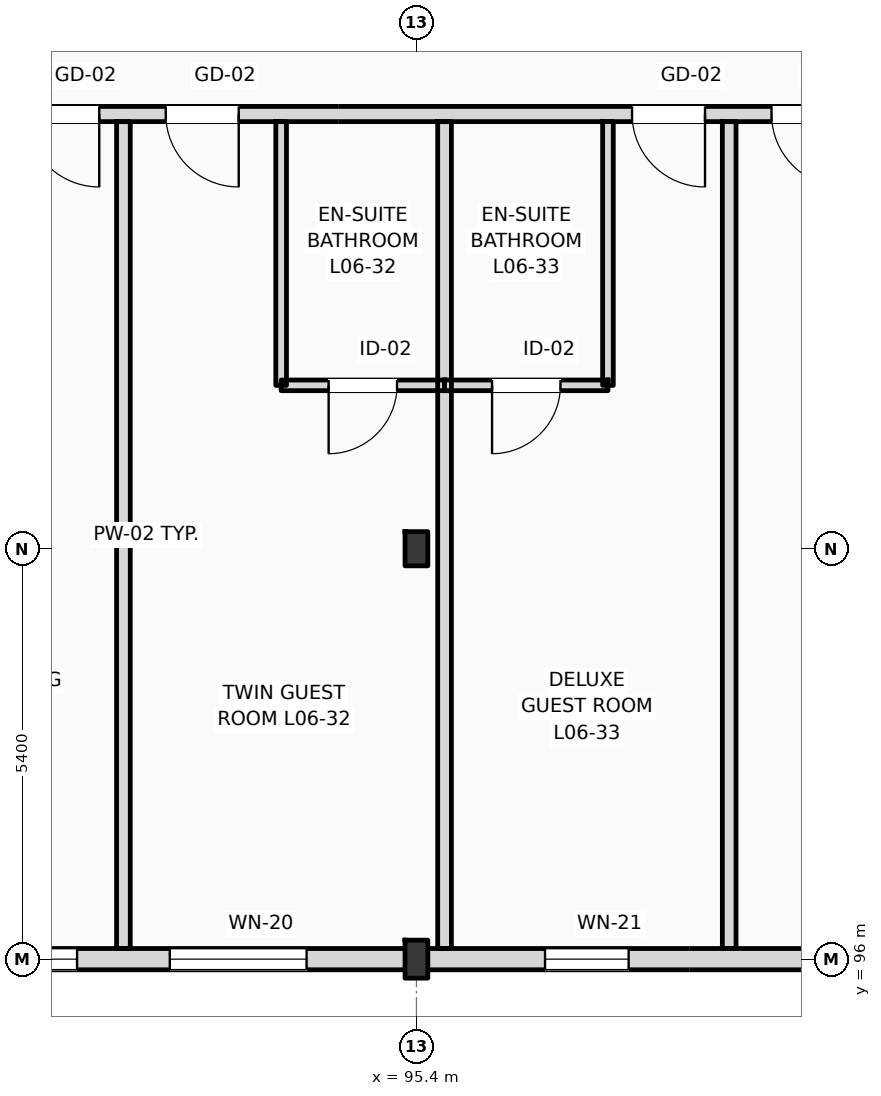
"""IFC4 building model, lengths in metres.
Left out: names, types, materials, properties, quantities, classifications, styles, units other than length and angle.
Written with IfcOpenShell. Run it as: python <this file> out.ifc"""

import sys

from ifc_helpers import new_model, si_unit, direction, frame, frame_2d, origin, origin_2d, place, context, subcontext, project, spatial, rectangle, i_section, extrude, element, fill, save


model = new_model("IFC4")
c1 = context("Model", 3, precision=1e-05, world=origin(), true_north=direction((0.0, 1.0)))
c2 = subcontext(c1, "Body", "Model", "MODEL_VIEW")
j1 = project(units=[si_unit("LENGTHUNIT", "METRE"), si_unit("PLANEANGLEUNIT", "RADIAN")], contexts=[c1])
p1 = place(None, origin())
s1 = spatial("IfcSite", under=j1, at=p1, CompositionType="ELEMENT")
p2 = place(p1, origin())
s2 = spatial("IfcBuilding", under=s1, at=p2, CompositionType="ELEMENT")
p3 = place(p2, frame((0.0, 0.0, 28.2)))
s3 = spatial("IfcBuildingStorey", under=s2, at=p3, CompositionType="ELEMENT", Elevation=28.2)
p4 = place(p3, frame((95.4, 96.0, 0.0), z_axis=(0.0, 0.0, 1.0), x_axis=(1.0, 0.0, 0.0)))
e1 = element("IfcColumn", 1, at=p4, inside=s3, PredefinedType="COLUMN", context=c2, shape_type="SweptSolid", body=[
    extrude(i_section(OverallWidth=0.3, OverallDepth=0.5, WebThickness=0.014, FlangeThickness=0.028, FilletRadius=0.027, at=origin_2d()), origin(), (0.0, 0.0, 1.0), 3.6),
])
p5 = place(p3, frame((95.4, 101.4, 0.0), z_axis=(0.0, 0.0, 1.0), x_axis=(1.0, 0.0, 0.0)))
e2 = element("IfcColumn", 2, at=p5, inside=s3, PredefinedType="COLUMN", context=c2, shape_type="SweptSolid", body=[
    extrude(i_section(OverallWidth=0.3, OverallDepth=0.45, WebThickness=0.014, FlangeThickness=0.026, FilletRadius=0.027, at=origin_2d()), origin(), (0.0, 0.0, 1.0), 3.6),
])
p6 = place(p3, frame((25.2, 96.0, 0.0), z_axis=(0.0, 0.0, 1.0), x_axis=(1.0, 0.0, 0.0)))
e3 = element("IfcWall", 3, at=p6, inside=s3, PredefinedType="STANDARD", context=c2, shape_type="SweptSolid", body=[
    extrude(rectangle(XDim=94.8, YDim=0.28, at=frame_2d((47.4, 0.0))), origin(), (0.0, 0.0, 1.0), 2.8),
])
p7 = place(p6, frame((16.454, 0.0, 0.9)))
e4 = element("IfcOpeningElement", 4, at=p7, cuts=e3, PredefinedType="OPENING", context=c2, shape_type="SweptSolid", body=[
    extrude(rectangle(XDim=2.7, YDim=1.72, at=frame_2d((1.35, 0.86))), frame((0.0, 0.15, 0.0), z_axis=(0.0, -1.0, 0.0), x_axis=(1.0, 0.0, 0.0)), (0.0, 0.0, 1.0), 0.3),
])
p8 = place(p6, frame((20.068, 0.0, 0.9)))
e5 = element("IfcOpeningElement", 5, at=p8, cuts=e3, PredefinedType="OPENING", context=c2, shape_type="SweptSolid", body=[
    extrude(rectangle(XDim=2.389, YDim=1.72, at=frame_2d((1.194, 0.86))), frame((0.0, 0.15, 0.0), z_axis=(0.0, -1.0, 0.0), x_axis=(1.0, 0.0, 0.0)), (0.0, 0.0, 1.0), 0.3),
])
p9 = place(p6, frame((24.277, 0.0, 0.9)))
e6 = element("IfcOpeningElement", 6, at=p9, cuts=e3, PredefinedType="OPENING", context=c2, shape_type="SweptSolid", body=[
    extrude(rectangle(XDim=1.8, YDim=1.72, at=frame_2d((0.9, 0.86))), frame((0.0, 0.15, 0.0), z_axis=(0.0, -1.0, 0.0), x_axis=(1.0, 0.0, 0.0)), (0.0, 0.0, 1.0), 0.3),
])
p10 = place(p6, frame((27.885, 0.0, 0.9)))
e7 = element("IfcOpeningElement", 7, at=p10, cuts=e3, PredefinedType="OPENING", context=c2, shape_type="SweptSolid", body=[
    extrude(rectangle(XDim=2.388, YDim=1.72, at=frame_2d((1.194, 0.86))), frame((0.0, 0.15, 0.0), z_axis=(0.0, -1.0, 0.0), x_axis=(1.0, 0.0, 0.0)), (0.0, 0.0, 1.0), 0.3),
])
p11 = place(p6, frame((32.093, 0.0, 0.9)))
e8 = element("IfcOpeningElement", 8, at=p11, cuts=e3, PredefinedType="OPENING", context=c2, shape_type="SweptSolid", body=[
    extrude(rectangle(XDim=1.8, YDim=1.72, at=frame_2d((0.9, 0.86))), frame((0.0, 0.15, 0.0), z_axis=(0.0, -1.0, 0.0), x_axis=(1.0, 0.0, 0.0)), (0.0, 0.0, 1.0), 0.3),
])
p12 = place(p6, frame((35.702, 0.0, 0.9)))
e9 = element("IfcOpeningElement", 9, at=p12, cuts=e3, PredefinedType="OPENING", context=c2, shape_type="SweptSolid", body=[
    extrude(rectangle(XDim=2.488, YDim=1.72, at=frame_2d((1.244, 0.86))), frame((0.0, 0.15, 0.0), z_axis=(0.0, -1.0, 0.0), x_axis=(1.0, 0.0, 0.0)), (0.0, 0.0, 1.0), 0.3),
])
p13 = place(p6, frame((55.56, 0.0, 0.9)))
e10 = element("IfcOpeningElement", 10, at=p13, cuts=e3, PredefinedType="OPENING", context=c2, shape_type="SweptSolid", body=[
    extrude(rectangle(XDim=1.8, YDim=1.72, at=frame_2d((0.9, 0.86))), frame((0.0, 0.15, 0.0), z_axis=(0.0, -1.0, 0.0), x_axis=(1.0, 0.0, 0.0)), (0.0, 0.0, 1.0), 0.3),
])
p14 = place(p6, frame((58.985, 0.0, 0.9)))
e11 = element("IfcOpeningElement", 11, at=p14, cuts=e3, PredefinedType="OPENING", context=c2, shape_type="SweptSolid", body=[
    extrude(rectangle(XDim=1.8, YDim=1.72, at=frame_2d((0.9, 0.86))), frame((0.0, 0.15, 0.0), z_axis=(0.0, -1.0, 0.0), x_axis=(1.0, 0.0, 0.0)), (0.0, 0.0, 1.0), 0.3),
])
p15 = place(p6, frame((63.21, 0.0, 0.9)))
e12 = element("IfcOpeningElement", 12, at=p15, cuts=e3, PredefinedType="OPENING", context=c2, shape_type="SweptSolid", body=[
    extrude(rectangle(XDim=2.525, YDim=1.72, at=frame_2d((1.262, 0.86))), frame((0.0, 0.15, 0.0), z_axis=(0.0, -1.0, 0.0), x_axis=(1.0, 0.0, 0.0)), (0.0, 0.0, 1.0), 0.3),
])
p16 = place(p6, frame((66.955, 0.0, 0.9)))
e13 = element("IfcOpeningElement", 13, at=p16, cuts=e3, PredefinedType="OPENING", context=c2, shape_type="SweptSolid", body=[
    extrude(rectangle(XDim=1.8, YDim=1.72, at=frame_2d((0.9, 0.86))), frame((0.0, 0.15, 0.0), z_axis=(0.0, -1.0, 0.0), x_axis=(1.0, 0.0, 0.0)), (0.0, 0.0, 1.0), 0.3),
])
p17 = place(p6, frame((71.892, 0.0, 0.9)))
e14 = element("IfcOpeningElement", 14, at=p17, cuts=e3, PredefinedType="OPENING", context=c2, shape_type="SweptSolid", body=[
    extrude(rectangle(XDim=1.1, YDim=1.5, at=frame_2d((0.55, 0.75))), frame((0.0, 0.15, 0.0), z_axis=(0.0, -1.0, 0.0), x_axis=(1.0, 0.0, 0.0)), (0.0, 0.0, 1.0), 0.3),
])
p18 = place(p6, frame((75.802, 0.0, 0.9)))
e15 = element("IfcOpeningElement", 15, at=p18, cuts=e3, PredefinedType="OPENING", context=c2, shape_type="SweptSolid", body=[
    extrude(rectangle(XDim=1.25, YDim=1.6, at=frame_2d((0.625, 0.8))), frame((0.0, 0.15, 0.0), z_axis=(0.0, -1.0, 0.0), x_axis=(1.0, 0.0, 0.0)), (0.0, 0.0, 1.0), 0.3),
])
p19 = place(p6, frame((79.712, 0.0, 0.9)))
e16 = element("IfcOpeningElement", 16, at=p19, cuts=e3, PredefinedType="OPENING", context=c2, shape_type="SweptSolid", body=[
    extrude(rectangle(XDim=1.4, YDim=1.7, at=frame_2d((0.7, 0.85))), frame((0.0, 0.15, 0.0), z_axis=(0.0, -1.0, 0.0), x_axis=(1.0, 0.0, 0.0)), (0.0, 0.0, 1.0), 0.3),
])
p20 = place(p6, frame((83.597, 0.0, 0.9)))
e17 = element("IfcOpeningElement", 17, at=p20, cuts=e3, PredefinedType="OPENING", context=c2, shape_type="SweptSolid", body=[
    extrude(rectangle(XDim=1.6, YDim=1.72, at=frame_2d((0.8, 0.86))), frame((0.0, 0.15, 0.0), z_axis=(0.0, -1.0, 0.0), x_axis=(1.0, 0.0, 0.0)), (0.0, 0.0, 1.0), 0.3),
])
p21 = place(p6, frame((87.507, 0.0, 0.9)))
e18 = element("IfcOpeningElement", 18, at=p21, cuts=e3, PredefinedType="OPENING", context=c2, shape_type="SweptSolid", body=[
    extrude(rectangle(XDim=1.75, YDim=1.72, at=frame_2d((0.875, 0.86))), frame((0.0, 0.15, 0.0), z_axis=(0.0, -1.0, 0.0), x_axis=(1.0, 0.0, 0.0)), (0.0, 0.0, 1.0), 0.3),
])
p22 = place(p6, frame((91.328, 0.0, 0.9)))
e19 = element("IfcOpeningElement", 19, at=p22, cuts=e3, PredefinedType="OPENING", context=c2, shape_type="SweptSolid", body=[
    extrude(rectangle(XDim=2.0, YDim=1.72, at=frame_2d((1.0, 0.86))), frame((0.0, 0.15, 0.0), z_axis=(0.0, -1.0, 0.0), x_axis=(1.0, 0.0, 0.0)), (0.0, 0.0, 1.0), 0.3),
])
p23 = place(p3, frame((79.76, 107.12, 0.0), z_axis=(0.0, 0.0, 1.0), x_axis=(1.0, 0.0, 0.0)))
e20 = element("IfcWall", 20, at=p23, inside=s3, PredefinedType="PARTITIONING", context=c2, shape_type="SweptSolid", body=[
    extrude(rectangle(XDim=40.1, YDim=0.2, at=frame_2d((20.05, 0.0))), origin(), (0.0, 0.0, 1.0), 3.36),
])
p24 = place(p23, frame((2.497, 0.0, 0.0)))
e21 = element("IfcOpeningElement", 21, at=p24, cuts=e20, PredefinedType="OPENING", context=c2, shape_type="SweptSolid", body=[
    extrude(rectangle(XDim=0.96, YDim=2.2, at=frame_2d((0.48, 1.1))), frame((0.0, 0.11, 0.0), z_axis=(0.0, -1.0, 0.0), x_axis=(1.0, 0.0, 0.0)), (0.0, 0.0, 1.0), 0.22),
])
p25 = place(p23, frame((4.372, 0.0, 0.0)))
e22 = element("IfcOpeningElement", 22, at=p25, cuts=e20, PredefinedType="OPENING", context=c2, shape_type="SweptSolid", body=[
    extrude(rectangle(XDim=0.96, YDim=2.2, at=frame_2d((0.48, 1.1))), frame((0.0, 0.11, 0.0), z_axis=(0.0, -1.0, 0.0), x_axis=(1.0, 0.0, 0.0)), (0.0, 0.0, 1.0), 0.22),
])
p26 = place(p23, frame((10.507, 0.0, 0.0)))
e23 = element("IfcOpeningElement", 23, at=p26, cuts=e20, PredefinedType="OPENING", context=c2, shape_type="SweptSolid", body=[
    extrude(rectangle(XDim=0.96, YDim=2.2, at=frame_2d((0.48, 1.1))), frame((0.0, 0.11, 0.0), z_axis=(0.0, -1.0, 0.0), x_axis=(1.0, 0.0, 0.0)), (0.0, 0.0, 1.0), 0.22),
])
p27 = place(p23, frame((12.342, 0.0, 0.0)))
e24 = element("IfcOpeningElement", 24, at=p27, cuts=e20, PredefinedType="OPENING", context=c2, shape_type="SweptSolid", body=[
    extrude(rectangle(XDim=0.96, YDim=2.2, at=frame_2d((0.48, 1.1))), frame((0.0, 0.11, 0.0), z_axis=(0.0, -1.0, 0.0), x_axis=(1.0, 0.0, 0.0)), (0.0, 0.0, 1.0), 0.22),
])
p28 = place(p23, frame((18.477, 0.0, 0.0)))
e25 = element("IfcOpeningElement", 25, at=p28, cuts=e20, PredefinedType="OPENING", context=c2, shape_type="SweptSolid", body=[
    extrude(rectangle(XDim=0.96, YDim=2.2, at=frame_2d((0.48, 1.1))), frame((0.0, 0.11, 0.0), z_axis=(0.0, -1.0, 0.0), x_axis=(1.0, 0.0, 0.0)), (0.0, 0.0, 1.0), 0.22),
])
p29 = place(p23, frame((20.312, 0.0, 0.0)))
e26 = element("IfcOpeningElement", 26, at=p29, cuts=e20, PredefinedType="OPENING", context=c2, shape_type="SweptSolid", body=[
    extrude(rectangle(XDim=0.96, YDim=2.2, at=frame_2d((0.48, 1.1))), frame((0.0, 0.11, 0.0), z_axis=(0.0, -1.0, 0.0), x_axis=(1.0, 0.0, 0.0)), (0.0, 0.0, 1.0), 0.22),
])
p30 = place(p23, frame((26.447, 0.0, 0.0)))
e27 = element("IfcOpeningElement", 27, at=p30, cuts=e20, PredefinedType="OPENING", context=c2, shape_type="SweptSolid", body=[
    extrude(rectangle(XDim=0.96, YDim=2.2, at=frame_2d((0.48, 1.1))), frame((0.0, 0.11, 0.0), z_axis=(0.0, -1.0, 0.0), x_axis=(1.0, 0.0, 0.0)), (0.0, 0.0, 1.0), 0.22),
])
p31 = place(p23, frame((28.282, 0.0, 0.0)))
e28 = element("IfcOpeningElement", 28, at=p31, cuts=e20, PredefinedType="OPENING", context=c2, shape_type="SweptSolid", body=[
    extrude(rectangle(XDim=0.96, YDim=2.2, at=frame_2d((0.48, 1.1))), frame((0.0, 0.11, 0.0), z_axis=(0.0, -1.0, 0.0), x_axis=(1.0, 0.0, 0.0)), (0.0, 0.0, 1.0), 0.22),
])
p32 = place(p23, frame((34.417, 0.0, 0.0)))
e29 = element("IfcOpeningElement", 29, at=p32, cuts=e20, PredefinedType="OPENING", context=c2, shape_type="SweptSolid", body=[
    extrude(rectangle(XDim=0.96, YDim=2.2, at=frame_2d((0.48, 1.1))), frame((0.0, 0.11, 0.0), z_axis=(0.0, -1.0, 0.0), x_axis=(1.0, 0.0, 0.0)), (0.0, 0.0, 1.0), 0.22),
])
p33 = place(p23, frame((36.212, 0.0, 0.0)))
e30 = element("IfcOpeningElement", 30, at=p33, cuts=e20, PredefinedType="OPENING", context=c2, shape_type="SweptSolid", body=[
    extrude(rectangle(XDim=0.96, YDim=2.2, at=frame_2d((0.48, 1.1))), frame((0.0, 0.11, 0.0), z_axis=(0.0, -1.0, 0.0), x_axis=(1.0, 0.0, 0.0)), (0.0, 0.0, 1.0), 0.22),
])
for number, where, z_axis, x_axis in (
    (31, (91.545, 96.14, 0.0), (0.0, 0.0, 1.0), (0.0, 1.0, 0.0)),
    (32, (95.77, 96.14, 0.0), (0.0, 0.0, 1.0), (0.0, 1.0, 0.0)),
):
    element("IfcWall", number, at=place(p3, frame(where, z_axis=z_axis, x_axis=x_axis)), inside=s3, PredefinedType="PARTITIONING", context=c2, shape_type="SweptSolid", body=[
        extrude(rectangle(XDim=10.88, YDim=0.18, at=frame_2d((5.44, 0.0))), origin(), (0.0, 0.0, 1.0), 3.36),
    ])
p34 = place(p3, frame((93.62, 103.55, 0.0), z_axis=(0.0, 0.0, 1.0), x_axis=(0.0, 1.0, 0.0)))
e33 = element("IfcWall", 33, at=p34, inside=s3, PredefinedType="PARTITIONING", context=c2, shape_type="SweptSolid", body=[
    extrude(rectangle(XDim=3.47, YDim=0.14, at=frame_2d((1.735, 0.0))), origin(), (0.0, 0.0, 1.0), 3.36),
])
p35 = place(p3, frame((93.62, 103.55, 0.0), z_axis=(0.0, 0.0, 1.0), x_axis=(1.0, 0.0, 0.0)))
e34 = element("IfcWall", 34, at=p35, inside=s3, PredefinedType="PARTITIONING", context=c2, shape_type="SweptSolid", body=[
    extrude(rectangle(XDim=2.15, YDim=0.14, at=frame_2d((1.075, 0.0))), origin(), (0.0, 0.0, 1.0), 3.36),
])
p36 = place(p35, frame((0.625, 0.0, 0.0)))
e35 = element("IfcOpeningElement", 35, at=p36, cuts=e34, PredefinedType="OPENING", context=c2, shape_type="SweptSolid", body=[
    extrude(rectangle(XDim=0.9, YDim=2.1, at=frame_2d((0.45, 1.05))), frame((0.0, 0.08, 0.0), z_axis=(0.0, -1.0, 0.0), x_axis=(1.0, 0.0, 0.0)), (0.0, 0.0, 1.0), 0.16),
])
p37 = place(p3, frame((99.515, 96.14, 0.0), z_axis=(0.0, 0.0, 1.0), x_axis=(0.0, 1.0, 0.0)))
e36 = element("IfcWall", 36, at=p37, inside=s3, PredefinedType="PARTITIONING", context=c2, shape_type="SweptSolid", body=[
    extrude(rectangle(XDim=10.88, YDim=0.18, at=frame_2d((5.44, 0.0))), origin(), (0.0, 0.0, 1.0), 3.36),
])
p38 = place(p3, frame((97.92, 103.55, 0.0), z_axis=(0.0, 0.0, 1.0), x_axis=(0.0, 1.0, 0.0)))
e37 = element("IfcWall", 37, at=p38, inside=s3, PredefinedType="PARTITIONING", context=c2, shape_type="SweptSolid", body=[
    extrude(rectangle(XDim=3.47, YDim=0.14, at=frame_2d((1.735, 0.0))), origin(), (0.0, 0.0, 1.0), 3.05),
])
p39 = place(p3, frame((95.77, 103.55, 0.0), z_axis=(0.0, 0.0, 1.0), x_axis=(1.0, 0.0, 0.0)))
e38 = element("IfcWall", 38, at=p39, inside=s3, PredefinedType="PARTITIONING", context=c2, shape_type="SweptSolid", body=[
    extrude(rectangle(XDim=2.15, YDim=0.14, at=frame_2d((1.075, 0.0))), origin(), (0.0, 0.0, 1.0), 3.36),
])
p40 = place(p39, frame((0.625, 0.0, 0.0)))
e39 = element("IfcOpeningElement", 39, at=p40, cuts=e38, PredefinedType="OPENING", context=c2, shape_type="SweptSolid", body=[
    extrude(rectangle(XDim=0.9, YDim=2.1, at=frame_2d((0.45, 1.05))), frame((0.0, 0.08, 0.0), z_axis=(0.0, -1.0, 0.0), x_axis=(1.0, 0.0, 0.0)), (0.0, 0.0, 1.0), 0.16),
])
p41 = place(p15, origin())
e40 = element("IfcWindow", 40, at=p41, inside=s3, PartitioningType="DOUBLE_PANEL_VERTICAL", PredefinedType="WINDOW", context=c2, shape_type="SweptSolid", body=[
    extrude(rectangle(XDim=2.525, YDim=1.72, at=frame_2d((1.262, 0.86))), frame((0.0, 0.03, 0.0), z_axis=(0.0, -1.0, 0.0), x_axis=(1.0, 0.0, 0.0)), (0.0, 0.0, 1.0), 0.06),
])
fill(e12, e40)
p42 = place(p16, origin())
e41 = element("IfcWindow", 41, at=p42, inside=s3, PartitioningType="DOUBLE_PANEL_VERTICAL", PredefinedType="WINDOW", context=c2, shape_type="SweptSolid", body=[
    extrude(rectangle(XDim=1.8, YDim=1.72, at=frame_2d((0.9, 0.86))), frame((0.0, 0.03, 0.0), z_axis=(0.0, -1.0, 0.0), x_axis=(1.0, 0.0, 0.0)), (0.0, 0.0, 1.0), 0.06),
])
fill(e13, e41)
p43 = place(p17, origin())
e42 = element("IfcWindow", 42, at=p43, inside=s3, PartitioningType="DOUBLE_PANEL_VERTICAL", PredefinedType="WINDOW", context=c2, shape_type="SweptSolid", body=[
    extrude(rectangle(XDim=1.1, YDim=1.5, at=frame_2d((0.55, 0.75))), frame((0.0, 0.03, 0.0), z_axis=(0.0, -1.0, 0.0), x_axis=(1.0, 0.0, 0.0)), (0.0, 0.0, 1.0), 0.06),
])
fill(e14, e42)
p44 = place(p26, frame((0.96, 0.0, 0.0), z_axis=(0.0, 0.0, 1.0), x_axis=(-1.0, 0.0, 0.0)))
e43 = element("IfcDoor", 43, at=p44, inside=s3, OperationType="SINGLE_SWING_RIGHT", PredefinedType="DOOR", context=c2, shape_type="SweptSolid", body=[
    extrude(rectangle(XDim=0.96, YDim=2.2, at=frame_2d((0.48, 1.1))), frame((0.0, 0.025, 0.0), z_axis=(0.0, -1.0, 0.0), x_axis=(1.0, 0.0, 0.0)), (0.0, 0.0, 1.0), 0.05),
])
fill(e23, e43)
p45 = place(p27, frame((0.96, 0.0, 0.0), z_axis=(0.0, 0.0, 1.0), x_axis=(-1.0, 0.0, 0.0)))
e44 = element("IfcDoor", 44, at=p45, inside=s3, OperationType="SINGLE_SWING_RIGHT", PredefinedType="DOOR", context=c2, shape_type="SweptSolid", body=[
    extrude(rectangle(XDim=0.96, YDim=2.2, at=frame_2d((0.48, 1.1))), frame((0.0, 0.025, 0.0), z_axis=(0.0, -1.0, 0.0), x_axis=(1.0, 0.0, 0.0)), (0.0, 0.0, 1.0), 0.05),
])
fill(e24, e44)
p46 = place(p36, frame((0.9, 0.0, 0.0), z_axis=(0.0, 0.0, 1.0), x_axis=(-1.0, 0.0, 0.0)))
e45 = element("IfcDoor", 45, at=p46, inside=s3, OperationType="SINGLE_SWING_LEFT", PredefinedType="DOOR", context=c2, shape_type="SweptSolid", body=[
    extrude(rectangle(XDim=0.9, YDim=2.1, at=frame_2d((0.45, 1.05))), frame((0.0, 0.025, 0.0), z_axis=(0.0, -1.0, 0.0), x_axis=(1.0, 0.0, 0.0)), (0.0, 0.0, 1.0), 0.05),
])
fill(e35, e45)
p47 = place(p28, frame((0.96, 0.0, 0.0), z_axis=(0.0, 0.0, 1.0), x_axis=(-1.0, 0.0, 0.0)))
e46 = element("IfcDoor", 46, at=p47, inside=s3, OperationType="SINGLE_SWING_RIGHT", PredefinedType="DOOR", context=c2, shape_type="SweptSolid", body=[
    extrude(rectangle(XDim=0.96, YDim=2.2, at=frame_2d((0.48, 1.1))), frame((0.0, 0.025, 0.0), z_axis=(0.0, -1.0, 0.0), x_axis=(1.0, 0.0, 0.0)), (0.0, 0.0, 1.0), 0.05),
])
fill(e25, e46)
p48 = place(p40, frame((0.9, 0.0, 0.0), z_axis=(0.0, 0.0, 1.0), x_axis=(-1.0, 0.0, 0.0)))
e47 = element("IfcDoor", 47, at=p48, inside=s3, OperationType="SINGLE_SWING_LEFT", PredefinedType="DOOR", context=c2, shape_type="SweptSolid", body=[
    extrude(rectangle(XDim=0.9, YDim=2.1, at=frame_2d((0.45, 1.05))), frame((0.0, 0.025, 0.0), z_axis=(0.0, -1.0, 0.0), x_axis=(1.0, 0.0, 0.0)), (0.0, 0.0, 1.0), 0.05),
])
fill(e39, e47)
p49 = place(p29, frame((0.96, 0.0, 0.0), z_axis=(0.0, 0.0, 1.0), x_axis=(-1.0, 0.0, 0.0)))
e48 = element("IfcDoor", 48, at=p49, inside=s3, OperationType="SINGLE_SWING_RIGHT", PredefinedType="DOOR", context=c2, shape_type="SweptSolid", body=[
    extrude(rectangle(XDim=0.96, YDim=2.2, at=frame_2d((0.48, 1.1))), frame((0.0, 0.025, 0.0), z_axis=(0.0, -1.0, 0.0), x_axis=(1.0, 0.0, 0.0)), (0.0, 0.0, 1.0), 0.05),
])
fill(e26, e48)
save(model, sys.argv[1])
